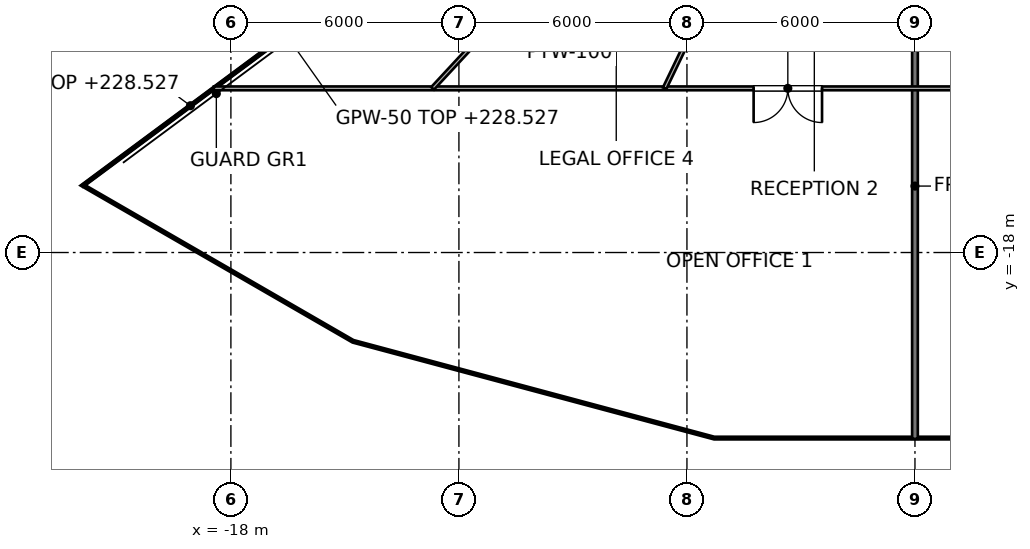
"""IFC4 building model, lengths in metres.
Left out: names, types, materials, properties, quantities, classifications, styles, units other than length and angle.
Written with IfcOpenShell. Run it as: python <this file> out.ifc"""

import sys

from ifc_helpers import new_model, si_unit, direction, frame, frame_2d, origin, place, context, subcontext, project, spatial, rectangle, extrude, element, fill, save


model = new_model("IFC4")
c1 = context("Model", 3, precision=1e-05, world=origin(), true_north=direction((0.0, 1.0)))
c2 = subcontext(c1, "Body", "Model", "MODEL_VIEW")
j1 = project(units=[si_unit("LENGTHUNIT", "METRE"), si_unit("PLANEANGLEUNIT", "RADIAN")], contexts=[c1])
p1 = place(None, origin())
s1 = spatial("IfcSite", under=j1, at=p1, CompositionType="ELEMENT")
p2 = place(p1, origin())
s2 = spatial("IfcBuilding", under=s1, at=p2, CompositionType="ELEMENT")
p3 = place(p2, frame((0.0, 0.0, 225.6)))
s3 = spatial("IfcBuildingStorey", under=s2, at=p3, CompositionType="ELEMENT", Elevation=225.6)
p4 = place(p3, frame((0.0, -22.903, 0.0), z_axis=(0.0, 0.0, 1.0), x_axis=(0.0, 1.0, 0.0)))
e1 = element("IfcWall", 1, at=p4, inside=s3, PredefinedType="PARTITIONING", context=c2, shape_type="SweptSolid", body=[
    extrude(rectangle(XDim=13.303, YDim=0.15, at=frame_2d((6.651, 0.0))), origin(), (0.0, 0.0, 1.0), 2.995),
])
p5 = place(p3, frame((-21.91, -16.247, 0.0), z_axis=(0.0, 0.0, 1.0), x_axis=(0.803238431987, 0.595657637724, 0.0)))
e2 = element("IfcWall", 2, at=p5, inside=s3, PredefinedType="PARTITIONING", context=c2, shape_type="SweptSolid", body=[
    extrude(rectangle(XDim=7.085, YDim=0.05, at=frame_2d((3.542, 0.0))), origin(), (0.0, 0.0, 1.0), 2.927),
])
p6 = place(p3, frame((-18.448, -13.68, 0.0), z_axis=(0.0, 0.0, 1.0), x_axis=(1.0, 0.0, 0.0)))
e3 = element("IfcWall", 3, at=p6, inside=s3, PredefinedType="PARTITIONING", context=c2, shape_type="SweptSolid", body=[
    extrude(rectangle(XDim=40.928, YDim=0.1, at=frame_2d((20.464, 0.0))), origin(), (0.0, 0.0, 1.0), 2.927),
])
p7 = place(p6, frame((14.203, 0.0, 0.0)))
e4 = element("IfcOpeningElement", 4, at=p7, cuts=e3, PredefinedType="OPENING", context=c2, shape_type="SweptSolid", body=[
    extrude(rectangle(XDim=1.8, YDim=2.1, at=frame_2d((0.9, 1.05))), frame((0.0, 0.05, 0.0), z_axis=(0.0, -1.0, 0.0), x_axis=(1.0, 0.0, 0.0)), (0.0, 0.0, 1.0), 0.1),
])
p8 = place(p6, frame((30.025, 0.0, 0.0)))
e5 = element("IfcOpeningElement", 5, at=p8, cuts=e3, PredefinedType="OPENING", context=c2, shape_type="SweptSolid", body=[
    extrude(rectangle(XDim=1.8, YDim=2.1, at=frame_2d((0.9, 1.05))), frame((0.0, 0.05, 0.0), z_axis=(0.0, -1.0, 0.0), x_axis=(1.0, 0.0, 0.0)), (0.0, 0.0, 1.0), 0.1),
])
p9 = place(p3, frame((-12.693, -13.68, 0.0), z_axis=(0.0, 0.0, 1.0), x_axis=(0.680136385704, 0.733085599942, 0.0)))
e6 = element("IfcWall", 6, at=p9, inside=s3, PredefinedType="PARTITIONING", context=c2, shape_type="SweptSolid", body=[
    extrude(rectangle(XDim=5.565, YDim=0.1, at=frame_2d((2.783, 0.0))), origin(), (0.0, 0.0, 1.0), 3.85),
])
p10 = place(p3, frame((-6.588, -13.68, 0.0), z_axis=(0.0, 0.0, 1.0), x_axis=(0.43390153131, 0.900960299418, 0.0)))
e7 = element("IfcWall", 7, at=p10, inside=s3, PredefinedType="PARTITIONING", context=c2, shape_type="SweptSolid", body=[
    extrude(rectangle(XDim=4.528, YDim=0.1, at=frame_2d((2.264, 0.0))), origin(), (0.0, 0.0, 1.0), 3.85),
])
p11 = place(p7, origin())
e8 = element("IfcDoor", 8, at=p11, inside=s3, OperationType="DOUBLE_DOOR_SINGLE_SWING", PredefinedType="DOOR", context=c2, shape_type="SweptSolid", body=[
    extrude(rectangle(XDim=1.8, YDim=2.1, at=frame_2d((0.9, 1.05))), frame((0.0, 0.025, 0.0), z_axis=(0.0, -1.0, 0.0), x_axis=(1.0, 0.0, 0.0)), (0.0, 0.0, 1.0), 0.05),
])
fill(e4, e8)
save(model, sys.argv[1])
